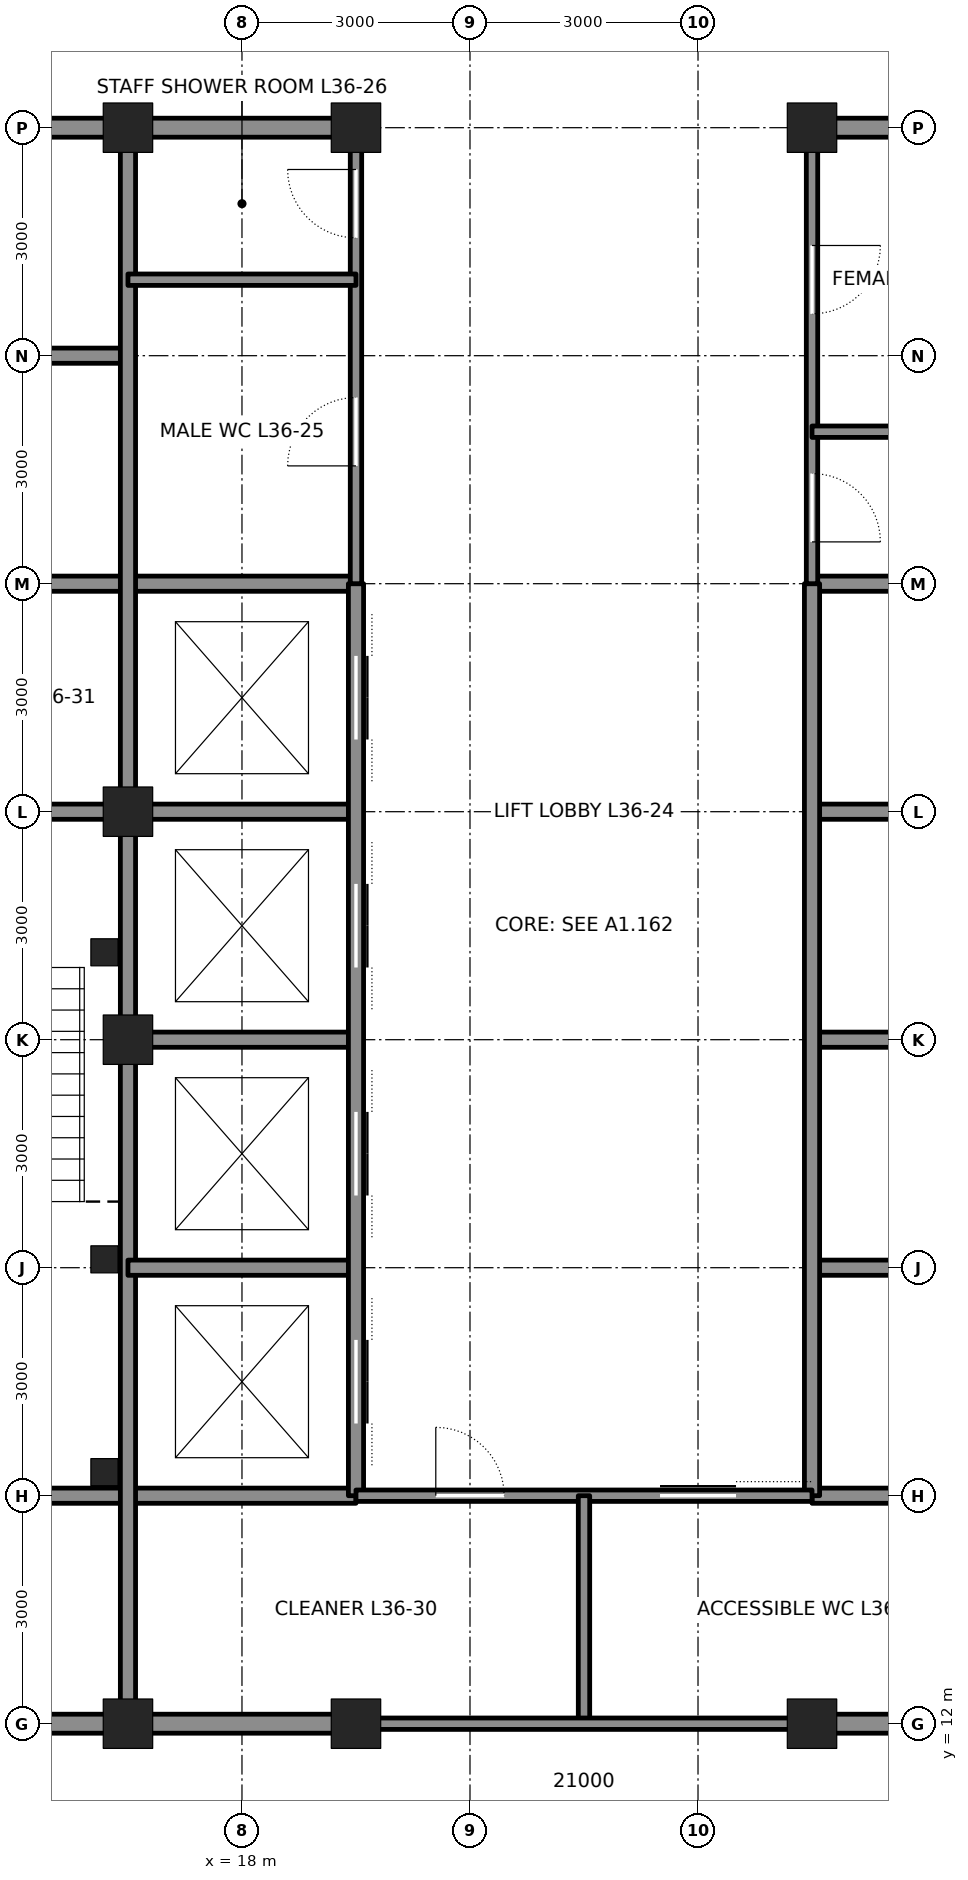
"""IFC4 building model, lengths in metres.
Left out: names, types, materials, properties, quantities, classifications, styles, units other than length and angle.
Written with IfcOpenShell. Run it as: python <this file> out.ifc"""

import sys

from ifc_helpers import new_model, si_unit, direction, frame, frame_2d, origin, origin_2d, place, context, subcontext, project, spatial, rectangle, hollow_rectangle, extrude, element, fill, save


model = new_model("IFC4")
c1 = context("Model", 3, precision=1e-05, world=origin(), true_north=direction((0.0, 1.0)))
c2 = subcontext(c1, "Body", "Model", "MODEL_VIEW")
j1 = project(units=[si_unit("LENGTHUNIT", "METRE"), si_unit("PLANEANGLEUNIT", "RADIAN")], contexts=[c1])
p1 = place(None, origin())
s1 = spatial("IfcSite", under=j1, at=p1, CompositionType="ELEMENT")
p2 = place(p1, origin())
s2 = spatial("IfcBuilding", under=s1, at=p2, CompositionType="ELEMENT")
p3 = place(p2, frame((0.0, 0.0, 165.6)))
s3 = spatial("IfcBuildingStorey", under=s2, at=p3, CompositionType="ELEMENT", Elevation=165.6)
for number, where, z_axis, x_axis in (
    (1, (16.5, 12.0, 0.0), (0.0, 0.0, 1.0), (1.0, 0.0, 0.0)),
    (2, (19.5, 12.0, 0.0), (0.0, 0.0, 1.0), (1.0, 0.0, 0.0)),
    (3, (25.5, 12.0, 0.0), (0.0, 0.0, 1.0), (1.0, 0.0, 0.0)),
    (4, (16.5, 33.0, 0.0), (0.0, 0.0, 1.0), (1.0, 0.0, 0.0)),
    (5, (19.5, 33.0, 0.0), (0.0, 0.0, 1.0), (1.0, 0.0, 0.0)),
    (6, (25.5, 33.0, 0.0), (0.0, 0.0, 1.0), (1.0, 0.0, 0.0)),
    (7, (16.5, 21.0, 0.0), (0.0, 0.0, 1.0), (1.0, 0.0, 0.0)),
    (8, (16.5, 24.0, 0.0), (0.0, 0.0, 1.0), (1.0, 0.0, 0.0)),
):
    element("IfcColumn", number, at=place(p3, frame(where, z_axis=z_axis, x_axis=x_axis)), inside=s3, PredefinedType="COLUMN", context=c2, shape_type="SweptSolid", body=[
        extrude(hollow_rectangle(XDim=0.65, YDim=0.65, WallThickness=0.065, at=origin_2d()), origin(), (0.0, 0.0, 1.0), 4.2),
    ])
p4 = place(p3, frame((12.25, 12.0, 0.0), z_axis=(0.0, 0.0, 1.0), x_axis=(1.0, 0.0, 0.0)))
e9 = element("IfcWall", 9, at=p4, inside=s3, PredefinedType="SOLIDWALL", context=c2, shape_type="SweptSolid", body=[
    extrude(rectangle(XDim=4.0, YDim=0.25, at=frame_2d((2.0, 0.0))), origin(), (0.0, 0.0, 1.0), 3.181),
])
for number, where, z_axis, x_axis in (
    (10, (16.75, 12.0, 0.0), (0.0, 0.0, 1.0), (1.0, 0.0, 0.0)),
    (11, (25.75, 12.0, 0.0), (0.0, 0.0, 1.0), (1.0, 0.0, 0.0)),
):
    element("IfcWall", number, at=place(p3, frame(where, z_axis=z_axis, x_axis=x_axis)), inside=s3, PredefinedType="SOLIDWALL", context=c2, shape_type="SweptSolid", body=[
        extrude(rectangle(XDim=2.5, YDim=0.25, at=frame_2d((1.25, 0.0))), origin(), (0.0, 0.0, 1.0), 3.181),
    ])
for number, where, z_axis, x_axis in (
    (12, (12.0, 15.0, 0.0), (0.0, 0.0, 1.0), (1.0, 0.0, 0.0)),
    (13, (25.5, 15.0, 0.0), (0.0, 0.0, 1.0), (1.0, 0.0, 0.0)),
):
    element("IfcWall", number, at=place(p3, frame(where, z_axis=z_axis, x_axis=x_axis)), inside=s3, PredefinedType="SOLIDWALL", context=c2, shape_type="SweptSolid", body=[
        extrude(rectangle(XDim=7.5, YDim=0.2, at=frame_2d((3.75, 0.0))), origin(), (0.0, 0.0, 1.0), 4.04),
    ])
p5 = place(p3, frame((12.25, 24.0, 0.0), z_axis=(0.0, 0.0, 1.0), x_axis=(1.0, 0.0, 0.0)))
e14 = element("IfcWall", 14, at=p5, inside=s3, PredefinedType="SOLIDWALL", context=c2, shape_type="SweptSolid", body=[
    extrude(rectangle(XDim=4.0, YDim=0.2, at=frame_2d((2.0, 0.0))), origin(), (0.0, 0.0, 1.0), 3.09),
])
p6 = place(p5, frame((1.4, 0.0, 0.0)))
e15 = element("IfcOpeningElement", 15, at=p6, cuts=e14, PredefinedType="OPENING", context=c2, shape_type="SweptSolid", body=[
    extrude(rectangle(XDim=1.2, YDim=2.1, at=frame_2d((0.6, 1.05))), frame((0.0, 0.11, 0.0), z_axis=(0.0, -1.0, 0.0), x_axis=(1.0, 0.0, 0.0)), (0.0, 0.0, 1.0), 0.22),
])
for number, where, z_axis, x_axis in (
    (16, (16.75, 24.0, 0.0), (0.0, 0.0, 1.0), (1.0, 0.0, 0.0)),
    (17, (25.5, 24.0, 0.0), (0.0, 0.0, 1.0), (1.0, 0.0, 0.0)),
):
    element("IfcWall", number, at=place(p3, frame(where, z_axis=z_axis, x_axis=x_axis)), inside=s3, PredefinedType="SOLIDWALL", context=c2, shape_type="SweptSolid", body=[
        extrude(rectangle(XDim=2.75, YDim=0.2, at=frame_2d((1.375, 0.0))), origin(), (0.0, 0.0, 1.0), 3.09),
    ])
p7 = place(p3, frame((12.0, 27.0, 0.0), z_axis=(0.0, 0.0, 1.0), x_axis=(1.0, 0.0, 0.0)))
e18 = element("IfcWall", 18, at=p7, inside=s3, PredefinedType="SOLIDWALL", context=c2, shape_type="SweptSolid", body=[
    extrude(rectangle(XDim=7.5, YDim=0.2, at=frame_2d((3.75, 0.0))), origin(), (0.0, 0.0, 1.0), 4.04),
])
p8 = place(p7, frame((1.65, 0.0, 0.0)))
e19 = element("IfcOpeningElement", 19, at=p8, cuts=e18, PredefinedType="OPENING", context=c2, shape_type="SweptSolid", body=[
    extrude(rectangle(XDim=1.2, YDim=2.1, at=frame_2d((0.6, 1.05))), frame((0.0, 0.11, 0.0), z_axis=(0.0, -1.0, 0.0), x_axis=(1.0, 0.0, 0.0)), (0.0, 0.0, 1.0), 0.22),
])
p9 = place(p3, frame((25.5, 27.0, 0.0), z_axis=(0.0, 0.0, 1.0), x_axis=(1.0, 0.0, 0.0)))
e20 = element("IfcWall", 20, at=p9, inside=s3, PredefinedType="SOLIDWALL", context=c2, shape_type="SweptSolid", body=[
    extrude(rectangle(XDim=3.0, YDim=0.2, at=frame_2d((1.5, 0.0))), origin(), (0.0, 0.0, 1.0), 4.04),
])
p10 = place(p3, frame((12.0, 30.0, 0.0), z_axis=(0.0, 0.0, 1.0), x_axis=(1.0, 0.0, 0.0)))
e21 = element("IfcWall", 21, at=p10, inside=s3, PredefinedType="SOLIDWALL", context=c2, shape_type="SweptSolid", body=[
    extrude(rectangle(XDim=4.5, YDim=0.2, at=frame_2d((2.25, 0.0))), origin(), (0.0, 0.0, 1.0), 4.04),
])
p11 = place(p3, frame((12.25, 33.0, 0.0), z_axis=(0.0, 0.0, 1.0), x_axis=(1.0, 0.0, 0.0)))
e22 = element("IfcWall", 22, at=p11, inside=s3, PredefinedType="SOLIDWALL", context=c2, shape_type="SweptSolid", body=[
    extrude(rectangle(XDim=4.0, YDim=0.25, at=frame_2d((2.0, 0.0))), origin(), (0.0, 0.0, 1.0), 3.181),
])
for number, where, z_axis, x_axis in (
    (23, (16.75, 33.0, 0.0), (0.0, 0.0, 1.0), (1.0, 0.0, 0.0)),
    (24, (25.75, 33.0, 0.0), (0.0, 0.0, 1.0), (1.0, 0.0, 0.0)),
):
    element("IfcWall", number, at=place(p3, frame(where, z_axis=z_axis, x_axis=x_axis)), inside=s3, PredefinedType="SOLIDWALL", context=c2, shape_type="SweptSolid", body=[
        extrude(rectangle(XDim=2.5, YDim=0.25, at=frame_2d((1.25, 0.0))), origin(), (0.0, 0.0, 1.0), 3.181),
    ])
p12 = place(p3, frame((16.5, 12.25, 0.0), z_axis=(0.0, 0.0, 1.0), x_axis=(0.0, 1.0, 0.0)))
e25 = element("IfcWall", 25, at=p12, inside=s3, PredefinedType="SOLIDWALL", context=c2, shape_type="SweptSolid", body=[
    extrude(rectangle(XDim=8.5, YDim=0.2, at=frame_2d((4.25, 0.0))), origin(), (0.0, 0.0, 1.0), 3.113),
])
p13 = place(p3, frame((16.5, 21.25, 0.0), z_axis=(0.0, 0.0, 1.0), x_axis=(0.0, 1.0, 0.0)))
e26 = element("IfcWall", 26, at=p13, inside=s3, PredefinedType="SOLIDWALL", context=c2, shape_type="SweptSolid", body=[
    extrude(rectangle(XDim=2.5, YDim=0.2, at=frame_2d((1.25, 0.0))), origin(), (0.0, 0.0, 1.0), 3.113),
])
p14 = place(p3, frame((16.5, 24.25, 0.0), z_axis=(0.0, 0.0, 1.0), x_axis=(0.0, 1.0, 0.0)))
e27 = element("IfcWall", 27, at=p14, inside=s3, PredefinedType="SOLIDWALL", context=c2, shape_type="SweptSolid", body=[
    extrude(rectangle(XDim=8.5, YDim=0.2, at=frame_2d((4.25, 0.0))), origin(), (0.0, 0.0, 1.0), 3.113),
])
p15 = place(p3, frame((16.5, 18.0, 0.0), z_axis=(0.0, 0.0, 1.0), x_axis=(1.0, 0.0, 0.0)))
e28 = element("IfcWall", 28, at=p15, inside=s3, PredefinedType="SOLIDWALL", context=c2, shape_type="SweptSolid", body=[
    extrude(rectangle(XDim=3.0, YDim=0.2, at=frame_2d((1.5, 0.0))), origin(), (0.0, 0.0, 1.0), 4.04),
])
p16 = place(p3, frame((25.5, 18.0, 0.0), z_axis=(0.0, 0.0, 1.0), x_axis=(1.0, 0.0, 0.0)))
e29 = element("IfcWall", 29, at=p16, inside=s3, PredefinedType="SOLIDWALL", context=c2, shape_type="SweptSolid", body=[
    extrude(rectangle(XDim=7.5, YDim=0.2, at=frame_2d((3.75, 0.0))), origin(), (0.0, 0.0, 1.0), 4.04),
])
p17 = place(p16, frame((4.65, 0.0, 0.0)))
e30 = element("IfcOpeningElement", 30, at=p17, cuts=e29, PredefinedType="OPENING", context=c2, shape_type="SweptSolid", body=[
    extrude(rectangle(XDim=1.2, YDim=2.1, at=frame_2d((0.6, 1.05))), frame((0.0, 0.11, 0.0), z_axis=(0.0, -1.0, 0.0), x_axis=(1.0, 0.0, 0.0)), (0.0, 0.0, 1.0), 0.22),
])
for number, where, z_axis, x_axis in (
    (31, (16.75, 21.0, 0.0), (0.0, 0.0, 1.0), (1.0, 0.0, 0.0)),
    (32, (25.5, 21.0, 0.0), (0.0, 0.0, 1.0), (1.0, 0.0, 0.0)),
):
    element("IfcWall", number, at=place(p3, frame(where, z_axis=z_axis, x_axis=x_axis)), inside=s3, PredefinedType="SOLIDWALL", context=c2, shape_type="SweptSolid", body=[
        extrude(rectangle(XDim=2.75, YDim=0.2, at=frame_2d((1.375, 0.0))), origin(), (0.0, 0.0, 1.0), 3.09),
    ])
p18 = place(p3, frame((19.5, 15.0, 0.0), z_axis=(0.0, 0.0, 1.0), x_axis=(0.0, 1.0, 0.0)))
e33 = element("IfcWall", 33, at=p18, inside=s3, PredefinedType="SOLIDWALL", context=c2, shape_type="SweptSolid", body=[
    extrude(rectangle(XDim=12.0, YDim=0.2, at=frame_2d((6.0, 0.0))), origin(), (0.0, 0.0, 1.0), 3.064),
])
p19 = place(p18, frame((0.95, 0.0, 0.0)))
e34 = element("IfcOpeningElement", 34, at=p19, cuts=e33, PredefinedType="OPENING", context=c2, shape_type="SweptSolid", body=[
    extrude(rectangle(XDim=1.1, YDim=2.1, at=frame_2d((0.55, 1.05))), frame((0.0, 0.11, 0.0), z_axis=(0.0, -1.0, 0.0), x_axis=(1.0, 0.0, 0.0)), (0.0, 0.0, 1.0), 0.22),
])
p20 = place(p18, frame((3.95, 0.0, 0.0)))
e35 = element("IfcOpeningElement", 35, at=p20, cuts=e33, PredefinedType="OPENING", context=c2, shape_type="SweptSolid", body=[
    extrude(rectangle(XDim=1.1, YDim=2.1, at=frame_2d((0.55, 1.05))), frame((0.0, 0.11, 0.0), z_axis=(0.0, -1.0, 0.0), x_axis=(1.0, 0.0, 0.0)), (0.0, 0.0, 1.0), 0.22),
])
p21 = place(p18, frame((6.95, 0.0, 0.0)))
e36 = element("IfcOpeningElement", 36, at=p21, cuts=e33, PredefinedType="OPENING", context=c2, shape_type="SweptSolid", body=[
    extrude(rectangle(XDim=1.1, YDim=2.1, at=frame_2d((0.55, 1.05))), frame((0.0, 0.11, 0.0), z_axis=(0.0, -1.0, 0.0), x_axis=(1.0, 0.0, 0.0)), (0.0, 0.0, 1.0), 0.22),
])
p22 = place(p18, frame((9.95, 0.0, 0.0)))
e37 = element("IfcOpeningElement", 37, at=p22, cuts=e33, PredefinedType="OPENING", context=c2, shape_type="SweptSolid", body=[
    extrude(rectangle(XDim=1.1, YDim=2.1, at=frame_2d((0.55, 1.05))), frame((0.0, 0.11, 0.0), z_axis=(0.0, -1.0, 0.0), x_axis=(1.0, 0.0, 0.0)), (0.0, 0.0, 1.0), 0.22),
])
p23 = place(p3, frame((19.5, 27.0, 0.0), z_axis=(0.0, 0.0, 1.0), x_axis=(0.0, 1.0, 0.0)))
e38 = element("IfcWall", 38, at=p23, inside=s3, PredefinedType="PARTITIONING", context=c2, shape_type="SweptSolid", body=[
    extrude(rectangle(XDim=5.75, YDim=0.15, at=frame_2d((2.875, 0.0))), origin(), (0.0, 0.0, 1.0), 3.064),
])
p24 = place(p23, frame((1.55, 0.0, 0.0)))
e39 = element("IfcOpeningElement", 39, at=p24, cuts=e38, PredefinedType="OPENING", context=c2, shape_type="SweptSolid", body=[
    extrude(rectangle(XDim=0.9, YDim=2.1, at=frame_2d((0.45, 1.05))), frame((0.0, 0.085, 0.0), z_axis=(0.0, -1.0, 0.0), x_axis=(1.0, 0.0, 0.0)), (0.0, 0.0, 1.0), 0.17),
])
p25 = place(p23, frame((4.55, 0.0, 0.0)))
e40 = element("IfcOpeningElement", 40, at=p25, cuts=e38, PredefinedType="OPENING", context=c2, shape_type="SweptSolid", body=[
    extrude(rectangle(XDim=0.9, YDim=2.1, at=frame_2d((0.45, 1.05))), frame((0.0, 0.085, 0.0), z_axis=(0.0, -1.0, 0.0), x_axis=(1.0, 0.0, 0.0)), (0.0, 0.0, 1.0), 0.17),
])
p26 = place(p3, frame((25.5, 15.0, 0.0), z_axis=(0.0, 0.0, 1.0), x_axis=(0.0, 1.0, 0.0)))
e41 = element("IfcWall", 41, at=p26, inside=s3, PredefinedType="SOLIDWALL", context=c2, shape_type="SweptSolid", body=[
    extrude(rectangle(XDim=12.0, YDim=0.2, at=frame_2d((6.0, 0.0))), origin(), (0.0, 0.0, 1.0), 3.064),
])
p27 = place(p3, frame((25.5, 27.0, 0.0), z_axis=(0.0, 0.0, 1.0), x_axis=(0.0, 1.0, 0.0)))
e42 = element("IfcWall", 42, at=p27, inside=s3, PredefinedType="PARTITIONING", context=c2, shape_type="SweptSolid", body=[
    extrude(rectangle(XDim=5.75, YDim=0.15, at=frame_2d((2.875, 0.0))), origin(), (0.0, 0.0, 1.0), 3.064),
])
p28 = place(p27, frame((0.55, 0.0, 0.0)))
e43 = element("IfcOpeningElement", 43, at=p28, cuts=e42, PredefinedType="OPENING", context=c2, shape_type="SweptSolid", body=[
    extrude(rectangle(XDim=0.9, YDim=2.1, at=frame_2d((0.45, 1.05))), frame((0.0, 0.085, 0.0), z_axis=(0.0, -1.0, 0.0), x_axis=(1.0, 0.0, 0.0)), (0.0, 0.0, 1.0), 0.17),
])
p29 = place(p27, frame((3.55, 0.0, 0.0)))
e44 = element("IfcOpeningElement", 44, at=p29, cuts=e42, PredefinedType="OPENING", context=c2, shape_type="SweptSolid", body=[
    extrude(rectangle(XDim=0.9, YDim=2.1, at=frame_2d((0.45, 1.05))), frame((0.0, 0.085, 0.0), z_axis=(0.0, -1.0, 0.0), x_axis=(1.0, 0.0, 0.0)), (0.0, 0.0, 1.0), 0.17),
])
p30 = place(p3, frame((19.5, 15.0, 0.0), z_axis=(0.0, 0.0, 1.0), x_axis=(1.0, 0.0, 0.0)))
e45 = element("IfcWall", 45, at=p30, inside=s3, PredefinedType="PARTITIONING", context=c2, shape_type="SweptSolid", body=[
    extrude(rectangle(XDim=6.0, YDim=0.15, at=frame_2d((3.0, 0.0))), origin(), (0.0, 0.0, 1.0), 4.04),
])
p31 = place(p30, frame((4.0, 0.0, 0.0)))
e46 = element("IfcOpeningElement", 46, at=p31, cuts=e45, PredefinedType="OPENING", context=c2, shape_type="SweptSolid", body=[
    extrude(rectangle(XDim=1.0, YDim=2.1, at=frame_2d((0.5, 1.05))), frame((0.0, 0.085, 0.0), z_axis=(0.0, -1.0, 0.0), x_axis=(1.0, 0.0, 0.0)), (0.0, 0.0, 1.0), 0.17),
])
p32 = place(p30, frame((1.05, 0.0, 0.0)))
e47 = element("IfcOpeningElement", 47, at=p32, cuts=e45, PredefinedType="OPENING", context=c2, shape_type="SweptSolid", body=[
    extrude(rectangle(XDim=0.9, YDim=2.1, at=frame_2d((0.45, 1.05))), frame((0.0, 0.085, 0.0), z_axis=(0.0, -1.0, 0.0), x_axis=(1.0, 0.0, 0.0)), (0.0, 0.0, 1.0), 0.17),
])
p33 = place(p3, frame((22.5, 15.0, 0.0), z_axis=(0.0, 0.0, 1.0), x_axis=(0.0, -1.0, 0.0)))
e48 = element("IfcWall", 48, at=p33, inside=s3, PredefinedType="PARTITIONING", context=c2, shape_type="SweptSolid", body=[
    extrude(rectangle(XDim=3.0, YDim=0.15, at=frame_2d((1.5, 0.0))), origin(), (0.0, 0.0, 1.0), 4.04),
])
p34 = place(p3, frame((19.5, 12.0, 0.0), z_axis=(0.0, 0.0, 1.0), x_axis=(1.0, 0.0, 0.0)))
e49 = element("IfcWall", 49, at=p34, inside=s3, PredefinedType="PARTITIONING", context=c2, shape_type="SweptSolid", body=[
    extrude(rectangle(XDim=6.0, YDim=0.15, at=frame_2d((3.0, 0.0))), origin(), (0.0, 0.0, 1.0), 3.181),
])
for number, where, z_axis, x_axis in (
    (50, (16.5, 31.0, 0.0), (0.0, 0.0, 1.0), (1.0, 0.0, 0.0)),
    (51, (25.5, 29.0, 0.0), (0.0, 0.0, 1.0), (1.0, 0.0, 0.0)),
):
    element("IfcWall", number, at=place(p3, frame(where, z_axis=z_axis, x_axis=x_axis)), inside=s3, PredefinedType="PARTITIONING", context=c2, shape_type="SweptSolid", body=[
        extrude(rectangle(XDim=3.0, YDim=0.15, at=frame_2d((1.5, 0.0))), origin(), (0.0, 0.0, 1.0), 4.04),
    ])
for number, where, z_axis, x_axis in (
    (52, (16.19, 15.31, 0.0), (0.0, 0.0, 1.0), (1.0, 0.0, 0.0)),
    (53, (16.19, 18.11, 0.0), (0.0, 0.0, 1.0), (1.0, 0.0, 0.0)),
    (54, (16.19, 22.15, 0.0), (0.0, 0.0, 1.0), (1.0, 0.0, 0.0)),
):
    element("IfcColumn", number, at=place(p3, frame(where, z_axis=z_axis, x_axis=x_axis)), inside=s3, PredefinedType="COLUMN", context=c2, shape_type="SweptSolid", body=[
        extrude(hollow_rectangle(XDim=0.356, YDim=0.356, WallThickness=0.015, at=origin_2d()), origin(), (0.0, 0.0, 1.0), 4.2),
    ])
p35 = place(p24, origin())
e55 = element("IfcDoor", 55, at=p35, inside=s3, OperationType="SINGLE_SWING_LEFT", PredefinedType="DOOR", context=c2, shape_type="SweptSolid", body=[
    extrude(rectangle(XDim=0.9, YDim=2.1, at=frame_2d((0.45, 1.05))), frame((0.0, 0.025, 0.0), z_axis=(0.0, -1.0, 0.0), x_axis=(1.0, 0.0, 0.0)), (0.0, 0.0, 1.0), 0.05),
])
fill(e39, e55)
p36 = place(p25, origin())
e56 = element("IfcDoor", 56, at=p36, inside=s3, OperationType="SINGLE_SWING_RIGHT", PredefinedType="DOOR", context=c2, shape_type="SweptSolid", body=[
    extrude(rectangle(XDim=0.9, YDim=2.1, at=frame_2d((0.45, 1.05))), frame((0.0, 0.025, 0.0), z_axis=(0.0, -1.0, 0.0), x_axis=(1.0, 0.0, 0.0)), (0.0, 0.0, 1.0), 0.05),
])
fill(e40, e56)
p37 = place(p28, frame((0.9, 0.0, 0.0), z_axis=(0.0, 0.0, 1.0), x_axis=(-1.0, 0.0, 0.0)))
e57 = element("IfcDoor", 57, at=p37, inside=s3, OperationType="SINGLE_SWING_RIGHT", PredefinedType="DOOR", context=c2, shape_type="SweptSolid", body=[
    extrude(rectangle(XDim=0.9, YDim=2.1, at=frame_2d((0.45, 1.05))), frame((0.0, 0.025, 0.0), z_axis=(0.0, -1.0, 0.0), x_axis=(1.0, 0.0, 0.0)), (0.0, 0.0, 1.0), 0.05),
])
fill(e43, e57)
p38 = place(p29, frame((0.9, 0.0, 0.0), z_axis=(0.0, 0.0, 1.0), x_axis=(-1.0, 0.0, 0.0)))
e58 = element("IfcDoor", 58, at=p38, inside=s3, OperationType="SINGLE_SWING_LEFT", PredefinedType="DOOR", context=c2, shape_type="SweptSolid", body=[
    extrude(rectangle(XDim=0.9, YDim=2.1, at=frame_2d((0.45, 1.05))), frame((0.0, 0.025, 0.0), z_axis=(0.0, -1.0, 0.0), x_axis=(1.0, 0.0, 0.0)), (0.0, 0.0, 1.0), 0.05),
])
fill(e44, e58)
p39 = place(p31, origin())
e59 = element("IfcDoor", 59, at=p39, inside=s3, OperationType="SLIDING_TO_LEFT", PredefinedType="DOOR", context=c2, shape_type="SweptSolid", body=[
    extrude(rectangle(XDim=1.0, YDim=2.1, at=frame_2d((0.5, 1.05))), frame((0.0, 0.025, 0.0), z_axis=(0.0, -1.0, 0.0), x_axis=(1.0, 0.0, 0.0)), (0.0, 0.0, 1.0), 0.05),
])
fill(e46, e59)
p40 = place(p32, origin())
e60 = element("IfcDoor", 60, at=p40, inside=s3, OperationType="SINGLE_SWING_LEFT", PredefinedType="DOOR", context=c2, shape_type="SweptSolid", body=[
    extrude(rectangle(XDim=0.9, YDim=2.1, at=frame_2d((0.45, 1.05))), frame((0.0, 0.025, 0.0), z_axis=(0.0, -1.0, 0.0), x_axis=(1.0, 0.0, 0.0)), (0.0, 0.0, 1.0), 0.05),
])
fill(e47, e60)
p41 = place(p19, origin())
e61 = element("IfcDoor", 61, at=p41, inside=s3, OperationType="DOUBLE_DOOR_SLIDING", PredefinedType="DOOR", context=c2, shape_type="SweptSolid", body=[
    extrude(rectangle(XDim=1.1, YDim=2.1, at=frame_2d((0.55, 1.05))), frame((0.0, 0.025, 0.0), z_axis=(0.0, -1.0, 0.0), x_axis=(1.0, 0.0, 0.0)), (0.0, 0.0, 1.0), 0.05),
])
fill(e34, e61)
p42 = place(p20, origin())
e62 = element("IfcDoor", 62, at=p42, inside=s3, OperationType="DOUBLE_DOOR_SLIDING", PredefinedType="DOOR", context=c2, shape_type="SweptSolid", body=[
    extrude(rectangle(XDim=1.1, YDim=2.1, at=frame_2d((0.55, 1.05))), frame((0.0, 0.025, 0.0), z_axis=(0.0, -1.0, 0.0), x_axis=(1.0, 0.0, 0.0)), (0.0, 0.0, 1.0), 0.05),
])
fill(e35, e62)
p43 = place(p21, origin())
e63 = element("IfcDoor", 63, at=p43, inside=s3, OperationType="DOUBLE_DOOR_SLIDING", PredefinedType="DOOR", context=c2, shape_type="SweptSolid", body=[
    extrude(rectangle(XDim=1.1, YDim=2.1, at=frame_2d((0.55, 1.05))), frame((0.0, 0.025, 0.0), z_axis=(0.0, -1.0, 0.0), x_axis=(1.0, 0.0, 0.0)), (0.0, 0.0, 1.0), 0.05),
])
fill(e36, e63)
p44 = place(p22, origin())
e64 = element("IfcDoor", 64, at=p44, inside=s3, OperationType="DOUBLE_DOOR_SLIDING", PredefinedType="DOOR", context=c2, shape_type="SweptSolid", body=[
    extrude(rectangle(XDim=1.1, YDim=2.1, at=frame_2d((0.55, 1.05))), frame((0.0, 0.025, 0.0), z_axis=(0.0, -1.0, 0.0), x_axis=(1.0, 0.0, 0.0)), (0.0, 0.0, 1.0), 0.05),
])
fill(e37, e64)
save(model, sys.argv[1])
